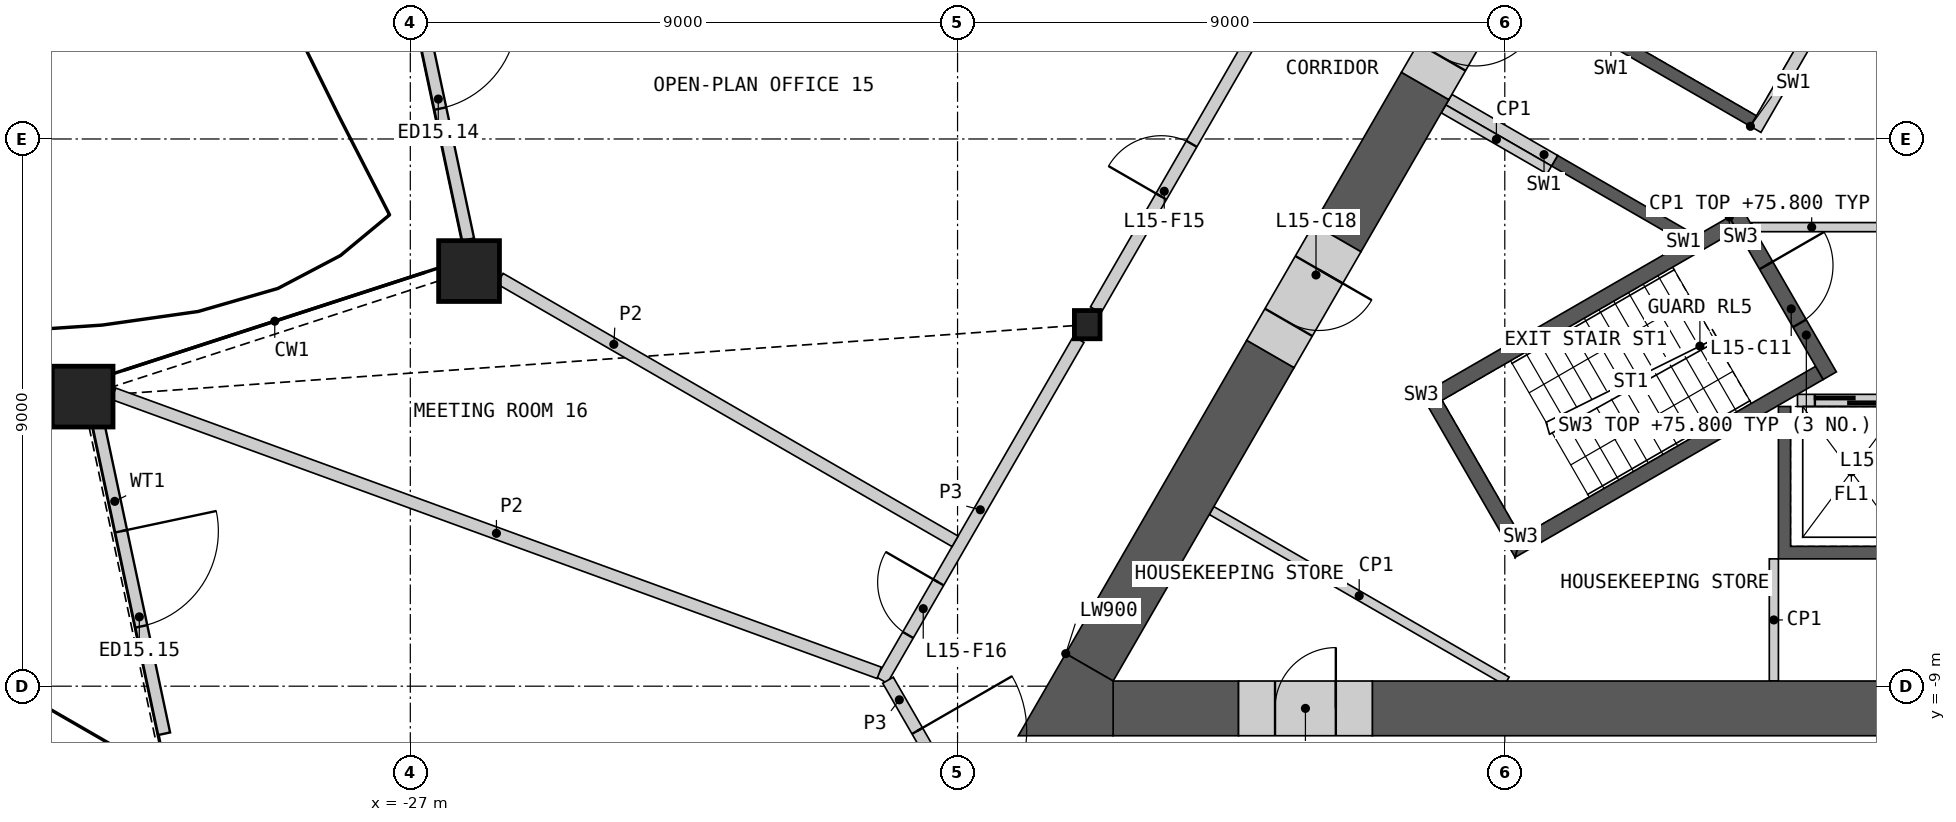
"""IFC4 building model, lengths in metres.
Left out: names, types, materials, properties, quantities, classifications, styles, units other than length and angle.
Written with IfcOpenShell. Run it as: python <this file> out.ifc"""

import sys

from ifc_helpers import new_model, si_unit, direction, frame, frame_2d, origin, origin_2d, place, context, subcontext, project, spatial, polyline, rectangle, hollow_rectangle, i_section, outline, extrude, element, fill, save


model = new_model("IFC4")
c1 = context("Model", 3, precision=1e-05, world=origin(), true_north=direction((0.0, 1.0)))
c2 = subcontext(c1, "Body", "Model", "MODEL_VIEW")
j1 = project(units=[si_unit("LENGTHUNIT", "METRE"), si_unit("PLANEANGLEUNIT", "RADIAN")], contexts=[c1])
p1 = place(None, origin())
s1 = spatial("IfcSite", under=j1, at=p1, CompositionType="ELEMENT")
p2 = place(p1, origin())
s2 = spatial("IfcBuilding", under=s1, at=p2, CompositionType="ELEMENT")
p3 = place(p2, frame((0.0, 0.0, 72.0)))
s3 = spatial("IfcBuildingStorey", under=s2, at=p3, CompositionType="ELEMENT", Elevation=72.0)
for number, where, z_axis, x_axis in (
    (1, (-26.034, -2.172, 0.0), (0.0, 0.0, 1.0), (1.0, 0.0, 0.0)),
    (2, (-32.389, -4.237, 0.0), (0.0, 0.0, 1.0), (1.0, 0.0, 0.0)),
):
    element("IfcColumn", number, at=place(p3, frame(where, z_axis=z_axis, x_axis=x_axis)), inside=s3, PredefinedType="COLUMN", context=c2, shape_type="SweptSolid", body=[
        extrude(hollow_rectangle(XDim=1.0, YDim=1.0, WallThickness=0.07, at=origin_2d()), origin(), (0.0, 0.0, 1.0), 4.2),
    ])
p4 = place(p3, frame((-15.868, -3.054, 0.0), z_axis=(0.0, 0.0, 1.0), x_axis=(1.0, 0.0, 0.0)))
e3 = element("IfcColumn", 3, at=p4, inside=s3, PredefinedType="COLUMN", context=c2, shape_type="SweptSolid", body=[
    extrude(i_section(OverallWidth=0.421, OverallDepth=0.465, WebThickness=0.045, FlangeThickness=0.072, at=origin_2d()), origin(), (0.0, 0.0, 1.0), 4.2),
])
p5 = place(p3, frame((-27.218, 3.848, 0.0), z_axis=(0.0, 0.0, 1.0), x_axis=(0.207943350029, -0.978140870825, 0.0)))
e4 = element("IfcWall", 4, at=p5, inside=s3, PredefinedType="SOLIDWALL", context=c2, shape_type="SweptSolid", body=[
    extrude(rectangle(XDim=5.626, YDim=0.2, at=frame_2d((2.813, 0.0))), origin(), (0.0, 0.0, 1.0), 3.189),
])
p6 = place(p5, frame((1.822, 0.0, 0.0)))
e5 = element("IfcOpeningElement", 5, at=p6, cuts=e4, PredefinedType="OPENING", context=c2, shape_type="SweptSolid", body=[
    extrude(rectangle(XDim=1.6, YDim=2.4, at=frame_2d((0.8, 1.2))), frame((0.0, 0.11, 0.0), z_axis=(0.0, -1.0, 0.0), x_axis=(1.0, 0.0, 0.0)), (0.0, 0.0, 1.0), 0.22),
])
p7 = place(p3, frame((-32.132, -4.686, 0.0), z_axis=(0.0, 0.0, 1.0), x_axis=(0.207896861912, -0.978150752598, 0.0)))
e6 = element("IfcWall", 6, at=p7, inside=s3, PredefinedType="SOLIDWALL", context=c2, shape_type="SweptSolid", body=[
    extrude(rectangle(XDim=5.21, YDim=0.2, at=frame_2d((2.605, 0.0))), origin(), (0.0, 0.0, 1.0), 3.189),
])
p8 = place(p7, frame((1.805, 0.0, 0.0)))
e7 = element("IfcOpeningElement", 7, at=p8, cuts=e6, PredefinedType="OPENING", context=c2, shape_type="SweptSolid", body=[
    extrude(rectangle(XDim=1.6, YDim=2.4, at=frame_2d((0.8, 1.2))), frame((0.0, 0.11, 0.0), z_axis=(0.0, -1.0, 0.0), x_axis=(1.0, 0.0, 0.0)), (0.0, 0.0, 1.0), 0.22),
])
p9 = place(p3, origin())
e8 = element("IfcWall", 8, at=p9, inside=s3, PredefinedType="SHEAR", context=c2, shape_type="SweptSolid", body=[
    extrude(outline(polyline([(4.5, -4.4), (4.5, -6.906), (-4.5, -6.906), (-4.5, -4.4), (-4.3, -4.4), (-4.3, -6.7), (-2.3, -6.7), (-2.3, -4.4), (-2.1, -4.4), (-2.1, -6.7), (-0.1, -6.7), (-0.1, -4.4), (0.1, -4.4), (0.1, -6.7), (2.1, -6.7), (2.1, -4.4), (2.3, -4.4), (2.3, -6.7), (4.3, -6.7), (4.3, -4.4), (4.5, -4.4)])), origin(), (0.0, 0.0, 1.0), 3.8),
])
p10 = place(p3, frame((-4.187, -4.3, 0.0), z_axis=(0.0, 0.0, 1.0), x_axis=(1.0, 0.0, 0.0)))
e9 = element("IfcWall", 9, at=p10, inside=s3, PredefinedType="SOLIDWALL", context=c2, shape_type="SweptSolid", body=[
    extrude(rectangle(XDim=8.373, YDim=0.2, at=frame_2d((4.187, 0.0))), origin(), (0.0, 0.0, 1.0), 3.8),
])
p11 = place(p10, frame((0.287, 0.0, 0.0)))
e10 = element("IfcOpeningElement", 10, at=p11, cuts=e9, PredefinedType="OPENING", context=c2, shape_type="SweptSolid", body=[
    extrude(rectangle(XDim=1.2, YDim=2.1, at=frame_2d((0.6, 1.05))), frame((0.0, 0.11, 0.0), z_axis=(0.0, -1.0, 0.0), x_axis=(1.0, 0.0, 0.0)), (0.0, 0.0, 1.0), 0.22),
])
p12 = place(p10, frame((2.387, 0.0, 0.0)))
e11 = element("IfcOpeningElement", 11, at=p12, cuts=e9, PredefinedType="OPENING", context=c2, shape_type="SweptSolid", body=[
    extrude(rectangle(XDim=1.4, YDim=2.1, at=frame_2d((0.7, 1.05))), frame((0.0, 0.11, 0.0), z_axis=(0.0, -1.0, 0.0), x_axis=(1.0, 0.0, 0.0)), (0.0, 0.0, 1.0), 0.22),
])
p13 = place(p10, frame((4.737, 0.0, 0.0)))
e12 = element("IfcOpeningElement", 12, at=p13, cuts=e9, PredefinedType="OPENING", context=c2, shape_type="SweptSolid", body=[
    extrude(rectangle(XDim=1.1, YDim=2.1, at=frame_2d((0.55, 1.05))), frame((0.0, 0.11, 0.0), z_axis=(0.0, -1.0, 0.0), x_axis=(1.0, 0.0, 0.0)), (0.0, 0.0, 1.0), 0.22),
])
p14 = place(p10, frame((6.887, 0.0, 0.0)))
e13 = element("IfcOpeningElement", 13, at=p14, cuts=e9, PredefinedType="OPENING", context=c2, shape_type="SweptSolid", body=[
    extrude(rectangle(XDim=1.2, YDim=2.1, at=frame_2d((0.6, 1.05))), frame((0.0, 0.11, 0.0), z_axis=(0.0, -1.0, 0.0), x_axis=(1.0, 0.0, 0.0)), (0.0, 0.0, 1.0), 0.22),
])
p15 = place(p3, origin())
e14 = element("IfcWall", 14, at=p15, inside=s3, PredefinedType="SHEAR", context=c2, shape_type="SweptSolid", body=[
    extrude(outline(polyline([(-6.061, -1.697), (-8.231, -0.444), (-8.131, -0.271), (-5.96, -1.524), (-6.061, -1.697)])), origin(), (0.0, 0.0, 1.0), 3.8),
])
p16 = place(p3, origin())
e15 = element("IfcWall", 15, at=p16, inside=s3, PredefinedType="SHEAR", context=c2, shape_type="SweptSolid", body=[
    extrude(outline(polyline([(-4.96, 0.208), (-7.131, 1.461), (-3.731, 7.35), (-1.561, 6.097), (-1.66, 5.924), (-3.652, 7.074), (-5.752, 3.437), (-3.76, 2.287), (-3.861, 2.113), (-5.852, 3.263), (-6.852, 1.531), (-4.861, 0.381), (-4.96, 0.208)])), origin(), (0.0, 0.0, 1.0), 3.8),
])
p17 = place(p3, frame((-1.631, 5.776, 0.0), z_axis=(0.0, 0.0, 1.0), x_axis=(-0.499992876559, -0.866029516466, 0.0)))
e16 = element("IfcWall", 16, at=p17, inside=s3, PredefinedType="SOLIDWALL", context=c2, shape_type="SweptSolid", body=[
    extrude(rectangle(XDim=6.486, YDim=0.2, at=frame_2d((3.243, 0.0))), origin(), (0.0, 0.0, 1.0), 3.8),
])
p18 = place(p17, frame((1.537, 0.0, 0.0)))
e17 = element("IfcOpeningElement", 17, at=p18, cuts=e16, PredefinedType="OPENING", context=c2, shape_type="SweptSolid", body=[
    extrude(rectangle(XDim=0.9, YDim=2.1, at=frame_2d((0.45, 1.05))), frame((0.0, 0.11, 0.0), z_axis=(0.0, -1.0, 0.0), x_axis=(1.0, 0.0, 0.0)), (0.0, 0.0, 1.0), 0.22),
])
p19 = place(p3, frame((-8.181, -0.357, 0.0), z_axis=(0.0, 0.0, 1.0), x_axis=(-0.866035824272, 0.499981950752, 0.0)))
e18 = element("IfcWall", 18, at=p19, inside=s3, PredefinedType="SHEAR", context=c2, shape_type="SweptSolid", body=[
    extrude(rectangle(XDim=2.009, YDim=0.2, at=frame_2d((1.004, 0.0))), origin(), (0.0, 0.0, 1.0), 3.8),
])
p20 = place(p3, frame((-4.941, -1.45, 0.0), z_axis=(0.0, 0.0, 1.0), x_axis=(1.0, 0.0, 0.0)))
e19 = element("IfcWall", 19, at=p20, inside=s3, PredefinedType="PARTITIONING", context=c2, shape_type="SweptSolid", body=[
    extrude(rectangle(XDim=9.882, YDim=0.15, at=frame_2d((4.941, 0.0))), origin(), (0.0, 0.0, 1.0), 3.8),
])
p21 = place(p20, frame((4.391, 0.0, 0.0)))
e20 = element("IfcOpeningElement", 20, at=p21, cuts=e19, PredefinedType="OPENING", context=c2, shape_type="SweptSolid", body=[
    extrude(rectangle(XDim=1.1, YDim=2.1, at=frame_2d((0.55, 1.05))), frame((0.0, 0.085, 0.0), z_axis=(0.0, -1.0, 0.0), x_axis=(1.0, 0.0, 0.0)), (0.0, 0.0, 1.0), 0.17),
])
p22 = place(p3, origin())
e21 = element("IfcWall", 21, at=p22, inside=s3, PredefinedType="SHEAR", context=c2, shape_type="SweptSolid", body=[
    extrude(outline(polyline([(-5.307, -1.281), (-10.374, -4.206), (-10.032, -4.298), (-5.182, -1.498), (-5.307, -1.281)])), origin(), (0.0, 0.0, 1.0), 3.8),
])
p23 = place(p3, origin())
e22 = element("IfcWall", 22, at=p23, inside=s3, PredefinedType="SHEAR", context=c2, shape_type="SweptSolid", body=[
    extrude(outline(polyline([(-10.374, -4.206), (-8.83, -6.881), (-8.738, -6.539), (-10.032, -4.298), (-10.374, -4.206)])), origin(), (0.0, 0.0, 1.0), 3.8),
])
p24 = place(p3, origin())
e23 = element("IfcWall", 23, at=p24, inside=s3, PredefinedType="SHEAR", context=c2, shape_type="SweptSolid", body=[
    extrude(outline(polyline([(-8.738, -6.539), (-8.83, -6.881), (-3.763, -3.956), (-3.888, -3.739), (-8.738, -6.539)])), origin(), (0.0, 0.0, 1.0), 3.8),
])
p25 = place(p3, frame((-5.199, -1.219, 0.0), z_axis=(0.0, 0.0, 1.0), x_axis=(0.499982516597, -0.866035497597, 0.0)))
e24 = element("IfcWall", 24, at=p25, inside=s3, PredefinedType="SHEAR", context=c2, shape_type="SweptSolid", body=[
    extrude(rectangle(XDim=3.088, YDim=0.25, at=frame_2d((1.544, 0.0))), origin(), (0.0, 0.0, 1.0), 3.8),
])
p26 = place(p25, frame((0.994, 0.0, 0.0)))
e25 = element("IfcOpeningElement", 25, at=p26, cuts=e24, PredefinedType="OPENING", context=c2, shape_type="SweptSolid", body=[
    extrude(rectangle(XDim=1.1, YDim=2.1, at=frame_2d((0.55, 1.05))), frame((0.0, 0.135, 0.0), z_axis=(0.0, -1.0, 0.0), x_axis=(1.0, 0.0, 0.0)), (0.0, 0.0, 1.0), 0.27),
])
p27 = place(p3, frame((-4.575, -6.906, 0.0), z_axis=(0.0, 0.0, 1.0), x_axis=(0.0, -1.0, 0.0)))
e26 = element("IfcWall", 26, at=p27, inside=s3, PredefinedType="PARTITIONING", context=c2, shape_type="SweptSolid", body=[
    extrude(rectangle(XDim=2.009, YDim=0.15, at=frame_2d((1.004, 0.0))), origin(), (0.0, 0.0, 1.0), 3.8),
])
p28 = place(p3, frame((-8.268, -0.509, 0.0), z_axis=(0.0, 0.0, 1.0), x_axis=(-0.866035824272, 0.499981950752, 0.0)))
e27 = element("IfcWall", 27, at=p28, inside=s3, PredefinedType="PARTITIONING", context=c2, shape_type="SweptSolid", body=[
    extrude(rectangle(XDim=2.009, YDim=0.15, at=frame_2d((1.004, 0.0))), origin(), (0.0, 0.0, 1.0), 3.8),
])
p29 = place(p3, frame((-13.823, -6.111, 0.0), z_axis=(0.0, 0.0, 1.0), x_axis=(0.866026802741, -0.499997576928, 0.0)))
e28 = element("IfcWall", 28, at=p29, inside=s3, PredefinedType="PARTITIONING", context=c2, shape_type="SweptSolid", body=[
    extrude(rectangle(XDim=5.607, YDim=0.15, at=frame_2d((2.804, 0.0))), origin(), (0.0, 0.0, 1.0), 3.8),
])
p30 = place(p3, frame((-11.179, -9.365, 0.0), z_axis=(0.0, 0.0, 1.0), x_axis=(1.0, 0.0, 0.0)))
e29 = element("IfcWall", 29, at=p30, inside=s3, PredefinedType="SHEAR", context=c2, shape_type="SweptSolid", body=[
    extrude(rectangle(XDim=10.079, YDim=0.9, at=frame_2d((5.04, 0.0))), origin(), (0.0, 0.0, 1.0), 3.8),
])
p31 = place(p3, frame((-15.441, -9.365, 0.0), z_axis=(0.0, 0.0, 1.0), x_axis=(1.0, 0.0, 0.0)))
e30 = element("IfcWall", 30, at=p31, inside=s3, PredefinedType="SHEAR", context=c2, shape_type="SweptSolid", body=[
    extrude(rectangle(XDim=2.062, YDim=0.9, at=frame_2d((1.031, 0.0))), origin(), (0.0, 0.0, 1.0), 3.8),
])
p32 = place(p3, frame((-12.855, -3.536, 0.0), z_axis=(0.0, 0.0, 1.0), x_axis=(-0.499999419053, -0.866025739194, 0.0)))
e31 = element("IfcWall", 31, at=p32, inside=s3, PredefinedType="SHEAR", context=c2, shape_type="SweptSolid", body=[
    extrude(rectangle(XDim=5.952, YDim=0.9, at=frame_2d((2.976, 0.0))), origin(), (0.0, 0.0, 1.0), 3.8),
])
p33 = place(p3, frame((-10.31, 0.872, 0.0), z_axis=(0.0, 0.0, 1.0), x_axis=(-0.499946751862, -0.866056144429, 0.0)))
e32 = element("IfcWall", 32, at=p33, inside=s3, PredefinedType="SHEAR", context=c2, shape_type="SweptSolid", body=[
    extrude(rectangle(XDim=2.889, YDim=0.9, at=frame_2d((1.445, 0.0))), origin(), (0.0, 0.0, 1.0), 3.8),
])
p34 = place(p3, origin())
e33 = element("IfcWall", 33, at=p34, inside=s3, PredefinedType="SHEAR", context=c2, shape_type="SweptSolid", body=[
    extrude(outline(polyline([(-16.221, -8.465), (-15.441, -8.915), (-15.441, -9.815), (-17.0, -9.815), (-16.221, -8.465)])), origin(), (0.0, 0.0, 1.0), 3.8),
])
p35 = place(p3, frame((-13.379, -9.365, 0.0), z_axis=(0.0, 0.0, 1.0), x_axis=(1.0, 0.0, 0.0)))
e34 = element("IfcWall", 34, at=p35, inside=s3, PredefinedType="SHEAR", context=c2, shape_type="SweptSolid", body=[
    extrude(rectangle(XDim=2.2, YDim=0.9, at=frame_2d((1.1, 0.0))), origin(), (0.0, 0.0, 1.0), 3.8),
])
p36 = place(p35, frame((0.6, 0.0, 0.0)))
e35 = element("IfcOpeningElement", 35, at=p36, cuts=e34, PredefinedType="OPENING", context=c2, shape_type="SweptSolid", body=[
    extrude(rectangle(XDim=1.0, YDim=2.1, at=frame_2d((0.5, 1.05))), frame((0.0, 0.46, 0.0), z_axis=(0.0, -1.0, 0.0), x_axis=(1.0, 0.0, 0.0)), (0.0, 0.0, 1.0), 0.92),
])
p37 = place(p3, frame((-11.755, -1.63, 0.0), z_axis=(0.0, 0.0, 1.0), x_axis=(-0.50002983664, -0.866008176907, 0.0)))
e36 = element("IfcWall", 36, at=p37, inside=s3, PredefinedType="SHEAR", context=c2, shape_type="SweptSolid", body=[
    extrude(rectangle(XDim=2.2, YDim=0.9, at=frame_2d((1.1, 0.0))), origin(), (0.0, 0.0, 1.0), 3.8),
])
p38 = place(p37, frame((0.6, 0.0, 0.0)))
e37 = element("IfcOpeningElement", 37, at=p38, cuts=e36, PredefinedType="OPENING", context=c2, shape_type="SweptSolid", body=[
    extrude(rectangle(XDim=1.0, YDim=2.1, at=frame_2d((0.5, 1.05))), frame((0.0, 0.46, 0.0), z_axis=(0.0, -1.0, 0.0), x_axis=(1.0, 0.0, 0.0)), (0.0, 0.0, 1.0), 0.92),
])
p39 = place(p3, frame((-9.21, 2.777, 0.0), z_axis=(0.0, 0.0, 1.0), x_axis=(-0.500077893725, -0.86598042715, 0.0)))
e38 = element("IfcWall", 38, at=p39, inside=s3, PredefinedType="SHEAR", context=c2, shape_type="SweptSolid", body=[
    extrude(rectangle(XDim=2.2, YDim=0.9, at=frame_2d((1.1, 0.0))), origin(), (0.0, 0.0, 1.0), 3.8),
])
p40 = place(p39, frame((0.55, 0.0, 0.0)))
e39 = element("IfcOpeningElement", 39, at=p40, cuts=e38, PredefinedType="OPENING", context=c2, shape_type="SweptSolid", body=[
    extrude(rectangle(XDim=1.1, YDim=2.1, at=frame_2d((0.55, 1.05))), frame((0.0, 0.46, 0.0), z_axis=(0.0, -1.0, 0.0), x_axis=(1.0, 0.0, 0.0)), (0.0, 0.0, 1.0), 0.92),
])
p41 = place(p3, frame((-15.728, -2.811, 0.0), z_axis=(0.0, 0.0, 1.0), x_axis=(0.49999175339, 0.866030164915, 0.0)))
e40 = element("IfcWall", 40, at=p41, inside=s3, PredefinedType="PARTITIONING", context=c2, shape_type="SweptSolid", body=[
    extrude(rectangle(XDim=10.019, YDim=0.2, at=frame_2d((5.009, 0.0))), origin(), (0.0, 0.0, 1.0), 3.8),
])
p42 = place(p41, frame((2.154, 0.0, 0.0)))
e41 = element("IfcOpeningElement", 41, at=p42, cuts=e40, PredefinedType="OPENING", context=c2, shape_type="SweptSolid", body=[
    extrude(rectangle(XDim=1.0, YDim=2.1, at=frame_2d((0.5, 1.05))), frame((0.0, 0.11, 0.0), z_axis=(0.0, -1.0, 0.0), x_axis=(1.0, 0.0, 0.0)), (0.0, 0.0, 1.0), 0.22),
])
p43 = place(p3, frame((-19.244, -8.902, 0.0), z_axis=(0.0, 0.0, 1.0), x_axis=(0.499984737558, 0.86603421538, 0.0)))
e42 = element("IfcWall", 42, at=p43, inside=s3, PredefinedType="PARTITIONING", context=c2, shape_type="SweptSolid", body=[
    extrude(rectangle(XDim=6.473, YDim=0.2, at=frame_2d((3.236, 0.0))), origin(), (0.0, 0.0, 1.0), 3.8),
])
p44 = place(p43, frame((0.859, 0.0, 0.0)))
e43 = element("IfcOpeningElement", 43, at=p44, cuts=e42, PredefinedType="OPENING", context=c2, shape_type="SweptSolid", body=[
    extrude(rectangle(XDim=1.0, YDim=2.1, at=frame_2d((0.5, 1.05))), frame((0.0, 0.11, 0.0), z_axis=(0.0, -1.0, 0.0), x_axis=(1.0, 0.0, 0.0)), (0.0, 0.0, 1.0), 0.22),
])
p45 = place(p3, frame((-19.144, -8.902, 0.0), z_axis=(0.0, 0.0, 1.0), x_axis=(0.499958791762, -0.866049194065, 0.0)))
e44 = element("IfcWall", 44, at=p45, inside=s3, PredefinedType="PARTITIONING", context=c2, shape_type="SweptSolid", body=[
    extrude(rectangle(XDim=3.726, YDim=0.2, at=frame_2d((1.863, 0.0))), origin(), (0.0, 0.0, 1.0), 3.8),
])
p46 = place(p45, frame((0.963, 0.0, 0.0)))
e45 = element("IfcOpeningElement", 45, at=p46, cuts=e44, PredefinedType="OPENING", context=c2, shape_type="SweptSolid", body=[
    extrude(rectangle(XDim=1.8, YDim=2.1, at=frame_2d((0.9, 1.05))), frame((0.0, 0.11, 0.0), z_axis=(0.0, -1.0, 0.0), x_axis=(1.0, 0.0, 0.0)), (0.0, 0.0, 1.0), 0.22),
])
p47 = place(p3, frame((-31.879, -4.19, 0.0), z_axis=(0.0, 0.0, 1.0), x_axis=(0.939515478087, -0.34250644729, 0.0)))
e46 = element("IfcWall", 46, at=p47, inside=s3, PredefinedType="PARTITIONING", context=c2, shape_type="SweptSolid", body=[
    extrude(rectangle(XDim=13.402, YDim=0.2, at=frame_2d((6.701, 0.0))), origin(), (0.0, 0.0, 1.0), 2.885),
])
p48 = place(p3, frame((-25.524, -2.297, 0.0), z_axis=(0.0, 0.0, 1.0), x_axis=(0.866036909293, -0.499980071345, 0.0)))
e47 = element("IfcWall", 47, at=p48, inside=s3, PredefinedType="PARTITIONING", context=c2, shape_type="SweptSolid", body=[
    extrude(rectangle(XDim=8.641, YDim=0.2, at=frame_2d((4.32, 0.0))), origin(), (0.0, 0.0, 1.0), 2.885),
])
p49 = place(p6, origin())
e48 = element("IfcDoor", 48, at=p49, inside=s3, OperationType="DOUBLE_DOOR_SINGLE_SWING", PredefinedType="DOOR", context=c2, shape_type="SweptSolid", body=[
    extrude(rectangle(XDim=1.6, YDim=2.4, at=frame_2d((0.8, 1.2))), frame((0.0, 0.025, 0.0), z_axis=(0.0, -1.0, 0.0), x_axis=(1.0, 0.0, 0.0)), (0.0, 0.0, 1.0), 0.05),
])
fill(e5, e48)
p50 = place(p8, origin())
e49 = element("IfcDoor", 49, at=p50, inside=s3, OperationType="DOUBLE_DOOR_SINGLE_SWING", PredefinedType="DOOR", context=c2, shape_type="SweptSolid", body=[
    extrude(rectangle(XDim=1.6, YDim=2.4, at=frame_2d((0.8, 1.2))), frame((0.0, 0.025, 0.0), z_axis=(0.0, -1.0, 0.0), x_axis=(1.0, 0.0, 0.0)), (0.0, 0.0, 1.0), 0.05),
])
fill(e7, e49)
p51 = place(p11, origin())
e50 = element("IfcDoor", 50, at=p51, inside=s3, OperationType="SLIDING_TO_LEFT", PredefinedType="DOOR", context=c2, shape_type="SweptSolid", body=[
    extrude(rectangle(XDim=1.2, YDim=2.1, at=frame_2d((0.6, 1.05))), frame((0.0, 0.025, 0.0), z_axis=(0.0, -1.0, 0.0), x_axis=(1.0, 0.0, 0.0)), (0.0, 0.0, 1.0), 0.05),
])
fill(e10, e50)
p52 = place(p26, origin())
e51 = element("IfcDoor", 51, at=p52, inside=s3, OperationType="SINGLE_SWING_LEFT", PredefinedType="DOOR", context=c2, shape_type="SweptSolid", body=[
    extrude(rectangle(XDim=1.1, YDim=2.1, at=frame_2d((0.55, 1.05))), frame((0.0, 0.025, 0.0), z_axis=(0.0, -1.0, 0.0), x_axis=(1.0, 0.0, 0.0)), (0.0, 0.0, 1.0), 0.05),
])
fill(e25, e51)
p53 = place(p36, origin())
e52 = element("IfcDoor", 52, at=p53, inside=s3, OperationType="SINGLE_SWING_RIGHT", PredefinedType="DOOR", context=c2, shape_type="SweptSolid", body=[
    extrude(rectangle(XDim=1.0, YDim=2.1, at=frame_2d((0.5, 1.05))), frame((0.0, 0.205, 0.0), z_axis=(0.0, -1.0, 0.0), x_axis=(1.0, 0.0, 0.0)), (0.0, 0.0, 1.0), 0.05),
])
fill(e35, e52)
p54 = place(p38, origin())
e53 = element("IfcDoor", 53, at=p54, inside=s3, OperationType="SINGLE_SWING_LEFT", PredefinedType="DOOR", context=c2, shape_type="SweptSolid", body=[
    extrude(rectangle(XDim=1.0, YDim=2.1, at=frame_2d((0.5, 1.05))), frame((0.0, 0.205, 0.0), z_axis=(0.0, -1.0, 0.0), x_axis=(1.0, 0.0, 0.0)), (0.0, 0.0, 1.0), 0.05),
])
fill(e37, e53)
p55 = place(p40, origin())
e54 = element("IfcDoor", 54, at=p55, inside=s3, OperationType="SINGLE_SWING_LEFT", PredefinedType="DOOR", context=c2, shape_type="SweptSolid", body=[
    extrude(rectangle(XDim=1.1, YDim=2.1, at=frame_2d((0.55, 1.05))), frame((0.0, 0.205, 0.0), z_axis=(0.0, -1.0, 0.0), x_axis=(1.0, 0.0, 0.0)), (0.0, 0.0, 1.0), 0.05),
])
fill(e39, e54)
p56 = place(p42, origin())
e55 = element("IfcDoor", 55, at=p56, inside=s3, OperationType="SINGLE_SWING_LEFT", PredefinedType="DOOR", context=c2, shape_type="SweptSolid", body=[
    extrude(rectangle(XDim=1.0, YDim=2.1, at=frame_2d((0.5, 1.05))), frame((0.0, 0.025, 0.0), z_axis=(0.0, -1.0, 0.0), x_axis=(1.0, 0.0, 0.0)), (0.0, 0.0, 1.0), 0.05),
])
fill(e41, e55)
p57 = place(p44, origin())
e56 = element("IfcDoor", 56, at=p57, inside=s3, OperationType="SINGLE_SWING_RIGHT", PredefinedType="DOOR", context=c2, shape_type="SweptSolid", body=[
    extrude(rectangle(XDim=1.0, YDim=2.1, at=frame_2d((0.5, 1.05))), frame((0.0, 0.025, 0.0), z_axis=(0.0, -1.0, 0.0), x_axis=(1.0, 0.0, 0.0)), (0.0, 0.0, 1.0), 0.05),
])
fill(e43, e56)
p58 = place(p46, origin())
e57 = element("IfcDoor", 57, at=p58, inside=s3, OperationType="DOUBLE_DOOR_SINGLE_SWING", PredefinedType="DOOR", context=c2, shape_type="SweptSolid", body=[
    extrude(rectangle(XDim=1.8, YDim=2.1, at=frame_2d((0.9, 1.05))), frame((0.0, 0.025, 0.0), z_axis=(0.0, -1.0, 0.0), x_axis=(1.0, 0.0, 0.0)), (0.0, 0.0, 1.0), 0.05),
])
fill(e45, e57)
save(model, sys.argv[1])
